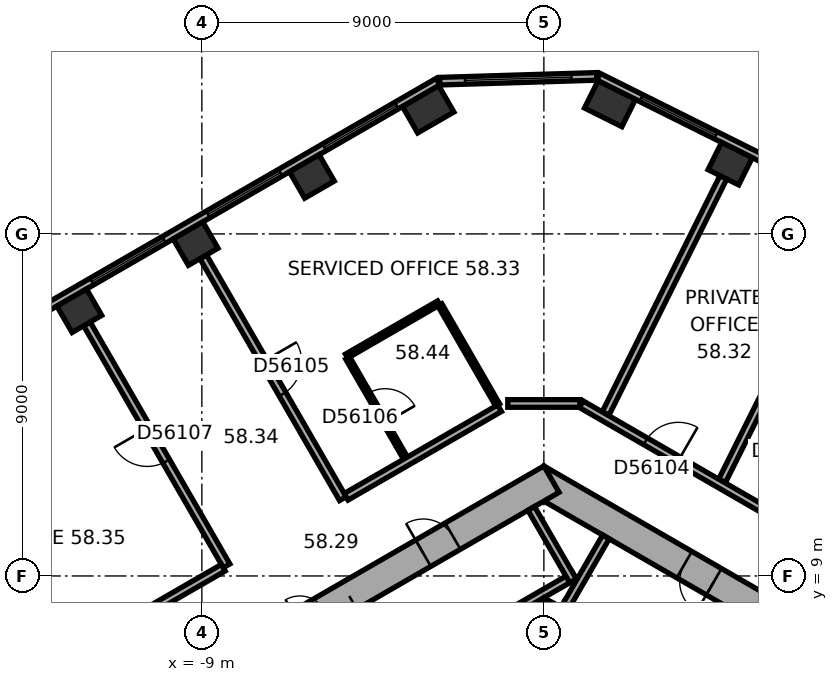
"""IFC4 building model, lengths in metres.
Left out: names, types, materials, properties, quantities, classifications, styles, units other than length and angle.
Written with IfcOpenShell. Run it as: python <this file> out.ifc"""

import sys

from ifc_helpers import new_model, si_unit, direction, frame, frame_2d, origin, origin_2d, place, context, subcontext, project, spatial, rectangle, extrude, element, fill, save


model = new_model("IFC4")
c1 = context("Model", 3, precision=1e-05, world=origin(), true_north=direction((0.0, 1.0)))
c2 = subcontext(c1, "Body", "Model", "MODEL_VIEW")
j1 = project(units=[si_unit("LENGTHUNIT", "METRE"), si_unit("PLANEANGLEUNIT", "RADIAN")], contexts=[c1])
p1 = place(None, origin())
s1 = spatial("IfcSite", under=j1, at=p1, CompositionType="ELEMENT")
p2 = place(p1, origin())
s2 = spatial("IfcBuilding", under=s1, at=p2, CompositionType="ELEMENT")
p3 = place(p2, frame((0.0, 0.0, 236.5)))
s3 = spatial("IfcBuildingStorey", under=s2, at=p3, CompositionType="ELEMENT", Elevation=236.5)
p4 = place(p3, frame((4.902, 19.848, 0.0), z_axis=(0.0, 0.0, 1.0), x_axis=(-0.894934361602, 0.44619781311, 0.0)))
e1 = element("IfcColumn", 1, at=p4, inside=s3, PredefinedType="COLUMN", context=c2, shape_type="SweptSolid", body=[
    extrude(rectangle(XDim=0.9, YDim=0.8, at=origin_2d()), origin(), (0.0, 0.0, 1.0), 3.7),
])
for number, where, z_axis, x_axis in (
    (2, (1.74, 21.425, 0.0), (0.0, 0.0, 1.0), (-0.895, 0.446, 0.0)),
    (3, (-3.044, 21.279, 0.0), (0.0, 0.0, 1.0), (-0.866, -0.5, 0.0)),
):
    element("IfcColumn", number, at=place(p3, frame(where, z_axis=z_axis, x_axis=x_axis)), inside=s3, PredefinedType="COLUMN", context=c2, shape_type="SweptSolid", body=[
        extrude(rectangle(XDim=1.1, YDim=0.8, at=origin_2d()), origin(), (0.0, 0.0, 1.0), 3.7),
    ])
for number, where, z_axis, x_axis in (
    (4, (-6.104, 19.512, 0.0), (0.0, 0.0, 1.0), (-0.866, -0.5, 0.0)),
    (5, (-9.165, 17.745, 0.0), (0.0, 0.0, 1.0), (-0.866, -0.5, 0.0)),
    (6, (-12.225, 15.978, 0.0), (0.0, 0.0, 1.0), (-0.866, -0.5, 0.0)),
):
    element("IfcColumn", number, at=place(p3, frame(where, z_axis=z_axis, x_axis=x_axis)), inside=s3, PredefinedType="COLUMN", context=c2, shape_type="SweptSolid", body=[
        extrude(rectangle(XDim=0.9, YDim=0.8, at=origin_2d()), origin(), (0.0, 0.0, 1.0), 3.7),
    ])
p5 = place(p3, frame((10.1, 5.6, 0.0), z_axis=(0.0, 0.0, 1.0), x_axis=(-0.866023897231, 0.500002609418, 0.0)))
e7 = element("IfcWall", 7, at=p5, inside=s3, PredefinedType="SHEAR", context=c2, shape_type="SweptSolid", body=[
    extrude(rectangle(XDim=11.894, YDim=0.8, at=frame_2d((5.947, 0.0))), origin(), (0.0, 0.0, 1.0), 3.7),
])
p6 = place(p5, frame((2.597, 0.0, 0.0)))
e8 = element("IfcOpeningElement", 8, at=p6, cuts=e7, PredefinedType="OPENING", context=c2, shape_type="SweptSolid", body=[
    extrude(rectangle(XDim=0.9, YDim=2.1, at=frame_2d((0.45, 1.05))), frame((0.0, 0.41, 0.0), z_axis=(0.0, -1.0, 0.0), x_axis=(1.0, 0.0, 0.0)), (0.0, 0.0, 1.0), 0.82),
])
p7 = place(p5, frame((6.497, 0.0, 0.0)))
e9 = element("IfcOpeningElement", 9, at=p7, cuts=e7, PredefinedType="OPENING", context=c2, shape_type="SweptSolid", body=[
    extrude(rectangle(XDim=0.9, YDim=2.1, at=frame_2d((0.45, 1.05))), frame((0.0, 0.41, 0.0), z_axis=(0.0, -1.0, 0.0), x_axis=(1.0, 0.0, 0.0)), (0.0, 0.0, 1.0), 0.82),
])
p8 = place(p3, frame((0.2, 11.547, 0.0), z_axis=(0.0, 0.0, 1.0), x_axis=(-0.866023897231, -0.500002609418, 0.0)))
e10 = element("IfcWall", 10, at=p8, inside=s3, PredefinedType="SHEAR", context=c2, shape_type="SweptSolid", body=[
    extrude(rectangle(XDim=11.894, YDim=0.8, at=frame_2d((5.947, 0.0))), origin(), (0.0, 0.0, 1.0), 3.7),
])
p9 = place(p8, frame((6.147, 0.0, 0.0)))
e11 = element("IfcOpeningElement", 11, at=p9, cuts=e10, PredefinedType="OPENING", context=c2, shape_type="SweptSolid", body=[
    extrude(rectangle(XDim=1.5, YDim=2.1, at=frame_2d((0.75, 1.05))), frame((0.0, 0.41, 0.0), z_axis=(0.0, -1.0, 0.0), x_axis=(1.0, 0.0, 0.0)), (0.0, 0.0, 1.0), 0.82),
])
p10 = place(p8, frame((2.997, 0.0, 0.0)))
e12 = element("IfcOpeningElement", 12, at=p10, cuts=e10, PredefinedType="OPENING", context=c2, shape_type="SweptSolid", body=[
    extrude(rectangle(XDim=0.9, YDim=2.1, at=frame_2d((0.45, 1.05))), frame((0.0, 0.41, 0.0), z_axis=(0.0, -1.0, 0.0), x_axis=(1.0, 0.0, 0.0)), (0.0, 0.0, 1.0), 0.82),
])
p11 = place(p3, frame((18.299, 13.727, 0.0), z_axis=(0.0, 0.0, 1.0), x_axis=(-0.894934554817, 0.44619742558, 0.0)))
e13 = element("IfcWall", 13, at=p11, inside=s3, PredefinedType="STANDARD", context=c2, shape_type="SweptSolid", body=[
    extrude(rectangle(XDim=18.841, YDim=0.2, at=frame_2d((9.421, 0.0))), origin(), (0.0, 0.0, 1.0), 3.7),
])
p12 = place(p11, frame((1.253, 0.0, 0.9)))
e14 = element("IfcOpeningElement", 14, at=p12, cuts=e13, PredefinedType="OPENING", context=c2, shape_type="SweptSolid", body=[
    extrude(rectangle(XDim=2.2, YDim=2.0, at=frame_2d((1.1, 1.0))), frame((0.0, 0.11, 0.0), z_axis=(0.0, -1.0, 0.0), x_axis=(1.0, 0.0, 0.0)), (0.0, 0.0, 1.0), 0.22),
])
p13 = place(p11, frame((4.786, 0.0, 0.9)))
e15 = element("IfcOpeningElement", 15, at=p13, cuts=e13, PredefinedType="OPENING", context=c2, shape_type="SweptSolid", body=[
    extrude(rectangle(XDim=2.2, YDim=2.0, at=frame_2d((1.1, 1.0))), frame((0.0, 0.11, 0.0), z_axis=(0.0, -1.0, 0.0), x_axis=(1.0, 0.0, 0.0)), (0.0, 0.0, 1.0), 0.22),
])
p14 = place(p11, frame((8.32, 0.0, 0.9)))
e16 = element("IfcOpeningElement", 16, at=p14, cuts=e13, PredefinedType="OPENING", context=c2, shape_type="SweptSolid", body=[
    extrude(rectangle(XDim=2.2, YDim=2.0, at=frame_2d((1.1, 1.0))), frame((0.0, 0.11, 0.0), z_axis=(0.0, -1.0, 0.0), x_axis=(1.0, 0.0, 0.0)), (0.0, 0.0, 1.0), 0.22),
])
p15 = place(p11, frame((11.854, 0.0, 0.9)))
e17 = element("IfcOpeningElement", 17, at=p15, cuts=e13, PredefinedType="OPENING", context=c2, shape_type="SweptSolid", body=[
    extrude(rectangle(XDim=2.2, YDim=2.0, at=frame_2d((1.1, 1.0))), frame((0.0, 0.11, 0.0), z_axis=(0.0, -1.0, 0.0), x_axis=(1.0, 0.0, 0.0)), (0.0, 0.0, 1.0), 0.22),
])
p16 = place(p11, frame((15.387, 0.0, 0.9)))
e18 = element("IfcOpeningElement", 18, at=p16, cuts=e13, PredefinedType="OPENING", context=c2, shape_type="SweptSolid", body=[
    extrude(rectangle(XDim=2.2, YDim=2.0, at=frame_2d((1.1, 1.0))), frame((0.0, 0.11, 0.0), z_axis=(0.0, -1.0, 0.0), x_axis=(1.0, 0.0, 0.0)), (0.0, 0.0, 1.0), 0.22),
])
p17 = place(p3, frame((1.389, 22.145, 0.0), z_axis=(0.0, 0.0, 1.0), x_axis=(-0.999534702881, -0.030502093955, 0.0)))
e19 = element("IfcWall", 19, at=p17, inside=s3, PredefinedType="STANDARD", context=c2, shape_type="SweptSolid", body=[
    extrude(rectangle(XDim=4.13, YDim=0.2, at=frame_2d((2.065, 0.0))), origin(), (0.0, 0.0, 1.0), 3.7),
])
p18 = place(p17, frame((0.665, 0.0, 0.9)))
e20 = element("IfcOpeningElement", 20, at=p18, cuts=e19, PredefinedType="OPENING", context=c2, shape_type="SweptSolid", body=[
    extrude(rectangle(XDim=2.8, YDim=2.0, at=frame_2d((1.4, 1.0))), frame((0.0, 0.11, 0.0), z_axis=(0.0, -1.0, 0.0), x_axis=(1.0, 0.0, 0.0)), (0.0, 0.0, 1.0), 0.22),
])
p19 = place(p3, frame((-2.786, 22.005, 0.0), z_axis=(0.0, 0.0, 1.0), x_axis=(-0.866026555358, -0.49999800541, 0.0)))
e21 = element("IfcWall", 21, at=p19, inside=s3, PredefinedType="STANDARD", context=c2, shape_type="SweptSolid", body=[
    extrude(rectangle(XDim=18.841, YDim=0.2, at=frame_2d((9.421, 0.0))), origin(), (0.0, 0.0, 1.0), 3.7),
])
p20 = place(p19, frame((1.254, 0.0, 0.9)))
e22 = element("IfcOpeningElement", 22, at=p20, cuts=e21, PredefinedType="OPENING", context=c2, shape_type="SweptSolid", body=[
    extrude(rectangle(XDim=2.2, YDim=2.0, at=frame_2d((1.1, 1.0))), frame((0.0, 0.11, 0.0), z_axis=(0.0, -1.0, 0.0), x_axis=(1.0, 0.0, 0.0)), (0.0, 0.0, 1.0), 0.22),
])
p21 = place(p19, frame((4.788, 0.0, 0.9)))
e23 = element("IfcOpeningElement", 23, at=p21, cuts=e21, PredefinedType="OPENING", context=c2, shape_type="SweptSolid", body=[
    extrude(rectangle(XDim=2.2, YDim=2.0, at=frame_2d((1.1, 1.0))), frame((0.0, 0.11, 0.0), z_axis=(0.0, -1.0, 0.0), x_axis=(1.0, 0.0, 0.0)), (0.0, 0.0, 1.0), 0.22),
])
p22 = place(p19, frame((8.321, 0.0, 0.9)))
e24 = element("IfcOpeningElement", 24, at=p22, cuts=e21, PredefinedType="OPENING", context=c2, shape_type="SweptSolid", body=[
    extrude(rectangle(XDim=2.2, YDim=2.0, at=frame_2d((1.1, 1.0))), frame((0.0, 0.11, 0.0), z_axis=(0.0, -1.0, 0.0), x_axis=(1.0, 0.0, 0.0)), (0.0, 0.0, 1.0), 0.22),
])
p23 = place(p19, frame((11.855, 0.0, 0.9)))
e25 = element("IfcOpeningElement", 25, at=p23, cuts=e21, PredefinedType="OPENING", context=c2, shape_type="SweptSolid", body=[
    extrude(rectangle(XDim=2.2, YDim=2.0, at=frame_2d((1.1, 1.0))), frame((0.0, 0.11, 0.0), z_axis=(0.0, -1.0, 0.0), x_axis=(1.0, 0.0, 0.0)), (0.0, 0.0, 1.0), 0.22),
])
p24 = place(p19, frame((15.389, 0.0, 0.9)))
e26 = element("IfcOpeningElement", 26, at=p24, cuts=e21, PredefinedType="OPENING", context=c2, shape_type="SweptSolid", body=[
    extrude(rectangle(XDim=2.2, YDim=2.0, at=frame_2d((1.1, 1.0))), frame((0.0, 0.11, 0.0), z_axis=(0.0, -1.0, 0.0), x_axis=(1.0, 0.0, 0.0)), (0.0, 0.0, 1.0), 0.22),
])
p25 = place(p3, frame((7.424, 4.259, 0.0), z_axis=(0.0, 0.0, 1.0), x_axis=(-0.866026010844, 0.49999894854, 0.0)))
e27 = element("IfcWall", 27, at=p25, inside=s3, PredefinedType="PARTITIONING", context=c2, shape_type="SweptSolid", body=[
    extrude(rectangle(XDim=8.0, YDim=0.2, at=frame_2d((4.0, 0.0))), origin(), (0.0, 0.0, 1.0), 3.42),
])
p26 = place(p3, frame((0.532, 8.122, 0.0), z_axis=(0.0, 0.0, 1.0), x_axis=(0.500077893725, 0.86598042715, 0.0)))
e28 = element("IfcWall", 28, at=p26, inside=s3, PredefinedType="PARTITIONING", context=c2, shape_type="SweptSolid", body=[
    extrude(rectangle(XDim=2.2, YDim=0.2, at=frame_2d((1.1, 0.0))), origin(), (0.0, 0.0, 1.0), 3.42),
])
p27 = place(p3, frame((0.803, 9.009, 0.0), z_axis=(0.0, 0.0, 1.0), x_axis=(-0.866028230842, -0.499995103361, 0.0)))
e29 = element("IfcWall", 29, at=p27, inside=s3, PredefinedType="PARTITIONING", context=c2, shape_type="SweptSolid", body=[
    extrude(rectangle(XDim=5.4, YDim=0.2, at=frame_2d((2.7, 0.0))), origin(), (0.0, 0.0, 1.0), 3.42),
])
p28 = place(p3, frame((0.767, 8.872, 0.0), z_axis=(0.0, 0.0, 1.0), x_axis=(-0.499994660107, 0.866028486751, 0.0)))
e30 = element("IfcWall", 30, at=p28, inside=s3, PredefinedType="PARTITIONING", context=c2, shape_type="SweptSolid", body=[
    extrude(rectangle(XDim=2.2, YDim=0.2, at=frame_2d((1.1, 0.0))), origin(), (0.0, 0.0, 1.0), 3.42),
])
p29 = place(p3, frame((-2.216, 4.282, 0.0), z_axis=(0.0, 0.0, 1.0), x_axis=(0.499977259774, 0.866038532462, 0.0)))
e31 = element("IfcWall", 31, at=p29, inside=s3, PredefinedType="SHEAR", context=c2, shape_type="SweptSolid", body=[
    extrude(rectangle(XDim=4.7, YDim=0.3, at=frame_2d((2.35, 0.0))), origin(), (0.0, 0.0, 1.0), 3.42),
])
p30 = place(p3, frame((-12.025, 15.632, 0.0), z_axis=(0.0, 0.0, 1.0), x_axis=(0.499983153418, -0.866035129944, 0.0)))
e32 = element("IfcWall", 32, at=p30, inside=s3, PredefinedType="PARTITIONING", context=c2, shape_type="SweptSolid", body=[
    extrude(rectangle(XDim=7.35, YDim=0.2, at=frame_2d((3.675, 0.0))), origin(), (0.0, 0.0, 1.0), 3.42),
])
p31 = place(p30, frame((3.175, 0.0, 0.0)))
e33 = element("IfcOpeningElement", 33, at=p31, cuts=e32, PredefinedType="OPENING", context=c2, shape_type="SweptSolid", body=[
    extrude(rectangle(XDim=1.0, YDim=2.1, at=frame_2d((0.5, 1.05))), frame((0.0, 0.11, 0.0), z_axis=(0.0, -1.0, 0.0), x_axis=(1.0, 0.0, 0.0)), (0.0, 0.0, 1.0), 0.22),
])
p32 = place(p3, frame((-8.965, 17.399, 0.0), z_axis=(0.0, 0.0, 1.0), x_axis=(0.499993683172, -0.866029050776, 0.0)))
e34 = element("IfcWall", 34, at=p32, inside=s3, PredefinedType="PARTITIONING", context=c2, shape_type="SweptSolid", body=[
    extrude(rectangle(XDim=7.35, YDim=0.2, at=frame_2d((3.675, 0.0))), origin(), (0.0, 0.0, 1.0), 2.87),
])
p33 = place(p32, frame((3.175, 0.0, 0.0)))
e35 = element("IfcOpeningElement", 35, at=p33, cuts=e34, PredefinedType="OPENING", context=c2, shape_type="SweptSolid", body=[
    extrude(rectangle(XDim=1.0, YDim=2.1, at=frame_2d((0.5, 1.05))), frame((0.0, 0.11, 0.0), z_axis=(0.0, -1.0, 0.0), x_axis=(1.0, 0.0, 0.0)), (0.0, 0.0, 1.0), 0.22),
])
p34 = place(p3, frame((-8.437, 9.217, 0.0), z_axis=(0.0, 0.0, 1.0), x_axis=(-0.866005660673, -0.500034194513, 0.0)))
e36 = element("IfcWall", 36, at=p34, inside=s3, PredefinedType="PARTITIONING", context=c2, shape_type="SweptSolid", body=[
    extrude(rectangle(XDim=3.209, YDim=0.2, at=frame_2d((1.604, 0.0))), origin(), (0.0, 0.0, 1.0), 3.42),
])
p35 = place(p3, frame((-5.191, 14.785, 0.0), z_axis=(0.0, 0.0, 1.0), x_axis=(0.866034573852, 0.49998411664, 0.0)))
e37 = element("IfcWall", 37, at=p35, inside=s3, PredefinedType="PARTITIONING", context=c2, shape_type="SweptSolid", body=[
    extrude(rectangle(XDim=2.8, YDim=0.12, at=frame_2d((1.4, 0.0))), origin(), (0.0, 0.0, 1.0), 3.42),
])
p36 = place(p3, frame((-3.641, 12.101, 0.0), z_axis=(0.0, 0.0, 1.0), x_axis=(-0.500026023896, 0.86601037836, 0.0)))
e38 = element("IfcWall", 38, at=p36, inside=s3, PredefinedType="PARTITIONING", context=c2, shape_type="SweptSolid", body=[
    extrude(rectangle(XDim=3.04, YDim=0.12, at=frame_2d((1.52, 0.0))), origin(), (0.0, 0.0, 1.0), 3.42),
])
p37 = place(p36, frame((1.07, 0.0, 0.0)))
e39 = element("IfcOpeningElement", 39, at=p37, cuts=e38, PredefinedType="OPENING", context=c2, shape_type="SweptSolid", body=[
    extrude(rectangle(XDim=0.9, YDim=2.1, at=frame_2d((0.45, 1.05))), frame((0.0, 0.07, 0.0), z_axis=(0.0, -1.0, 0.0), x_axis=(1.0, 0.0, 0.0)), (0.0, 0.0, 1.0), 0.14),
])
p38 = place(p3, frame((-2.737, 16.133, 0.0), z_axis=(0.0, 0.0, 1.0), x_axis=(0.500026023896, -0.86601037836, 0.0)))
e40 = element("IfcWall", 40, at=p38, inside=s3, PredefinedType="PARTITIONING", context=c2, shape_type="SweptSolid", body=[
    extrude(rectangle(XDim=3.04, YDim=0.12, at=frame_2d((1.52, 0.0))), origin(), (0.0, 0.0, 1.0), 3.42),
])
p39 = place(p3, frame((-1.167, 13.414, 0.0), z_axis=(0.0, 0.0, 1.0), x_axis=(-0.866023347809, -0.500003561037, 0.0)))
e41 = element("IfcWall", 41, at=p39, inside=s3, PredefinedType="PARTITIONING", context=c2, shape_type="SweptSolid", body=[
    extrude(rectangle(XDim=4.661, YDim=0.2, at=frame_2d((2.331, 0.0))), origin(), (0.0, 0.0, 1.0), 3.42),
])
p40 = place(p3, frame((0.95, 13.539, 0.0), z_axis=(0.0, 0.0, 1.0), x_axis=(-1.0, 0.0, 0.0)))
e42 = element("IfcWall", 42, at=p40, inside=s3, PredefinedType="PARTITIONING", context=c2, shape_type="SweptSolid", body=[
    extrude(rectangle(XDim=1.9, YDim=0.2, at=frame_2d((0.95, 0.0))), origin(), (0.0, 0.0, 1.0), 3.42),
])
p41 = place(p3, frame((4.723, 19.49, 0.0), z_axis=(0.0, 0.0, 1.0), x_axis=(-0.446186614574, -0.894939944898, 0.0)))
e43 = element("IfcWall", 43, at=p41, inside=s3, PredefinedType="PARTITIONING", context=c2, shape_type="SweptSolid", body=[
    extrude(rectangle(XDim=6.944, YDim=0.2, at=frame_2d((3.472, 0.0))), origin(), (0.0, 0.0, 1.0), 2.87),
])
p42 = place(p3, frame((7.886, 17.913, 0.0), z_axis=(0.0, 0.0, 1.0), x_axis=(-0.446204015428, -0.894931269213, 0.0)))
e44 = element("IfcWall", 44, at=p42, inside=s3, PredefinedType="PARTITIONING", context=c2, shape_type="SweptSolid", body=[
    extrude(rectangle(XDim=7.16, YDim=0.2, at=frame_2d((3.58, 0.0))), origin(), (0.0, 0.0, 1.0), 3.42),
])
p43 = place(p3, frame((8.505, 9.177, 0.0), z_axis=(0.0, 0.0, 1.0), x_axis=(-0.866019839902, 0.500009636803, 0.0)))
e45 = element("IfcWall", 45, at=p43, inside=s3, PredefinedType="PARTITIONING", context=c2, shape_type="SweptSolid", body=[
    extrude(rectangle(XDim=8.683, YDim=0.2, at=frame_2d((4.342, 0.0))), origin(), (0.0, 0.0, 1.0), 3.42),
])
p44 = place(p43, frame((5.73, 0.0, 0.0)))
e46 = element("IfcOpeningElement", 46, at=p44, cuts=e45, PredefinedType="OPENING", context=c2, shape_type="SweptSolid", body=[
    extrude(rectangle(XDim=1.0, YDim=2.1, at=frame_2d((0.5, 1.05))), frame((0.0, 0.11, 0.0), z_axis=(0.0, -1.0, 0.0), x_axis=(1.0, 0.0, 0.0)), (0.0, 0.0, 1.0), 0.22),
])
p45 = place(p16, origin())
e47 = element("IfcWindow", 47, at=p45, inside=s3, PartitioningType="SINGLE_PANEL", PredefinedType="WINDOW", context=c2, shape_type="SweptSolid", body=[
    extrude(rectangle(XDim=2.2, YDim=2.0, at=frame_2d((1.1, 1.0))), frame((0.0, 0.03, 0.0), z_axis=(0.0, -1.0, 0.0), x_axis=(1.0, 0.0, 0.0)), (0.0, 0.0, 1.0), 0.06),
])
fill(e18, e47)
p46 = place(p18, origin())
e48 = element("IfcWindow", 48, at=p46, inside=s3, PartitioningType="SINGLE_PANEL", PredefinedType="WINDOW", context=c2, shape_type="SweptSolid", body=[
    extrude(rectangle(XDim=2.8, YDim=2.0, at=frame_2d((1.4, 1.0))), frame((0.0, 0.03, 0.0), z_axis=(0.0, -1.0, 0.0), x_axis=(1.0, 0.0, 0.0)), (0.0, 0.0, 1.0), 0.06),
])
fill(e20, e48)
p47 = place(p20, origin())
e49 = element("IfcWindow", 49, at=p47, inside=s3, PartitioningType="SINGLE_PANEL", PredefinedType="WINDOW", context=c2, shape_type="SweptSolid", body=[
    extrude(rectangle(XDim=2.2, YDim=2.0, at=frame_2d((1.1, 1.0))), frame((0.0, 0.03, 0.0), z_axis=(0.0, -1.0, 0.0), x_axis=(1.0, 0.0, 0.0)), (0.0, 0.0, 1.0), 0.06),
])
fill(e22, e49)
p48 = place(p21, origin())
e50 = element("IfcWindow", 50, at=p48, inside=s3, PartitioningType="SINGLE_PANEL", PredefinedType="WINDOW", context=c2, shape_type="SweptSolid", body=[
    extrude(rectangle(XDim=2.2, YDim=2.0, at=frame_2d((1.1, 1.0))), frame((0.0, 0.03, 0.0), z_axis=(0.0, -1.0, 0.0), x_axis=(1.0, 0.0, 0.0)), (0.0, 0.0, 1.0), 0.06),
])
fill(e23, e50)
p49 = place(p22, origin())
e51 = element("IfcWindow", 51, at=p49, inside=s3, PartitioningType="SINGLE_PANEL", PredefinedType="WINDOW", context=c2, shape_type="SweptSolid", body=[
    extrude(rectangle(XDim=2.2, YDim=2.0, at=frame_2d((1.1, 1.0))), frame((0.0, 0.03, 0.0), z_axis=(0.0, -1.0, 0.0), x_axis=(1.0, 0.0, 0.0)), (0.0, 0.0, 1.0), 0.06),
])
fill(e24, e51)
p50 = place(p9, origin())
e52 = element("IfcDoor", 52, at=p50, inside=s3, OperationType="DOUBLE_DOOR_SINGLE_SWING", PredefinedType="DOOR", context=c2, shape_type="SweptSolid", body=[
    extrude(rectangle(XDim=1.5, YDim=2.1, at=frame_2d((0.75, 1.05))), frame((0.0, 0.025, 0.0), z_axis=(0.0, -1.0, 0.0), x_axis=(1.0, 0.0, 0.0)), (0.0, 0.0, 1.0), 0.05),
])
fill(e11, e52)
p51 = place(p7, origin())
e53 = element("IfcDoor", 53, at=p51, inside=s3, OperationType="SINGLE_SWING_LEFT", PredefinedType="DOOR", context=c2, shape_type="SweptSolid", body=[
    extrude(rectangle(XDim=0.9, YDim=2.1, at=frame_2d((0.45, 1.05))), frame((0.0, 0.025, 0.0), z_axis=(0.0, -1.0, 0.0), x_axis=(1.0, 0.0, 0.0)), (0.0, 0.0, 1.0), 0.05),
])
fill(e9, e53)
p52 = place(p10, origin())
e54 = element("IfcDoor", 54, at=p52, inside=s3, OperationType="SINGLE_SWING_LEFT", PredefinedType="DOOR", context=c2, shape_type="SweptSolid", body=[
    extrude(rectangle(XDim=0.9, YDim=2.1, at=frame_2d((0.45, 1.05))), frame((0.0, 0.025, 0.0), z_axis=(0.0, -1.0, 0.0), x_axis=(1.0, 0.0, 0.0)), (0.0, 0.0, 1.0), 0.05),
])
fill(e12, e54)
p53 = place(p44, origin())
e55 = element("IfcDoor", 55, at=p53, inside=s3, OperationType="SINGLE_SWING_LEFT", PredefinedType="DOOR", context=c2, shape_type="SweptSolid", body=[
    extrude(rectangle(XDim=1.0, YDim=2.1, at=frame_2d((0.5, 1.05))), frame((0.0, 0.025, 0.0), z_axis=(0.0, -1.0, 0.0), x_axis=(1.0, 0.0, 0.0)), (0.0, 0.0, 1.0), 0.05),
])
fill(e46, e55)
p54 = place(p33, origin())
e56 = element("IfcDoor", 56, at=p54, inside=s3, OperationType="SINGLE_SWING_LEFT", PredefinedType="DOOR", context=c2, shape_type="SweptSolid", body=[
    extrude(rectangle(XDim=1.0, YDim=2.1, at=frame_2d((0.5, 1.05))), frame((0.0, 0.025, 0.0), z_axis=(0.0, -1.0, 0.0), x_axis=(1.0, 0.0, 0.0)), (0.0, 0.0, 1.0), 0.05),
])
fill(e35, e56)
p55 = place(p37, origin())
e57 = element("IfcDoor", 57, at=p55, inside=s3, OperationType="SINGLE_SWING_LEFT", PredefinedType="DOOR", context=c2, shape_type="SweptSolid", body=[
    extrude(rectangle(XDim=0.9, YDim=2.1, at=frame_2d((0.45, 1.05))), frame((0.0, 0.025, 0.0), z_axis=(0.0, -1.0, 0.0), x_axis=(1.0, 0.0, 0.0)), (0.0, 0.0, 1.0), 0.05),
])
fill(e39, e57)
p56 = place(p31, origin())
e58 = element("IfcDoor", 58, at=p56, inside=s3, OperationType="SINGLE_SWING_LEFT", PredefinedType="DOOR", context=c2, shape_type="SweptSolid", body=[
    extrude(rectangle(XDim=1.0, YDim=2.1, at=frame_2d((0.5, 1.05))), frame((0.0, 0.025, 0.0), z_axis=(0.0, -1.0, 0.0), x_axis=(1.0, 0.0, 0.0)), (0.0, 0.0, 1.0), 0.05),
])
fill(e33, e58)
save(model, sys.argv[1])
